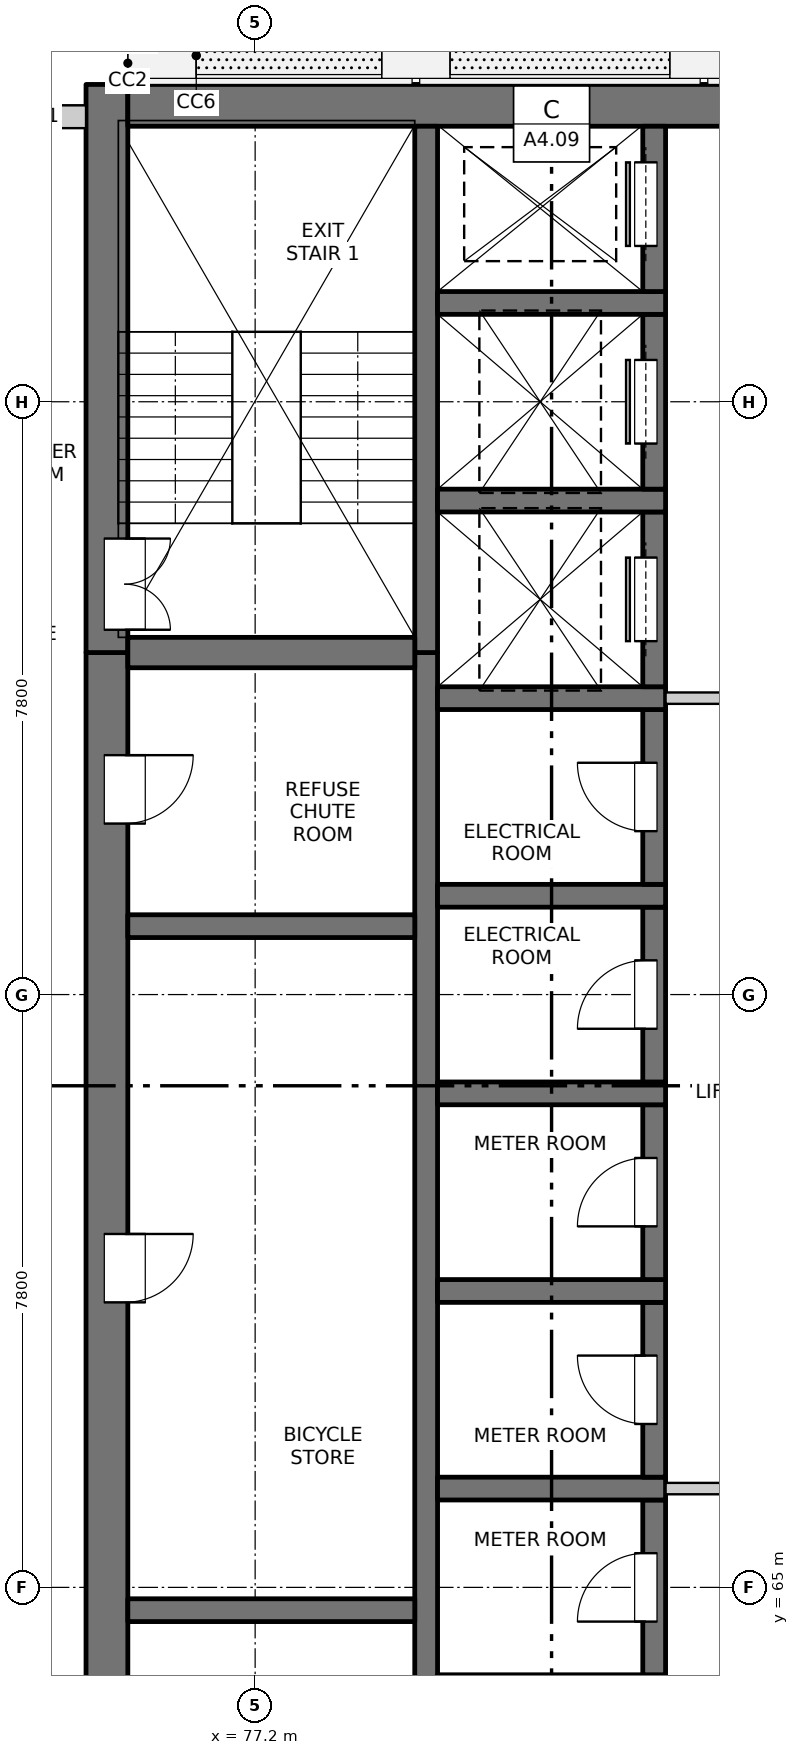
"""IFC4 building model, lengths in metres.
Left out: names, types, materials, properties, quantities, classifications, styles, units other than length and angle.
Written with IfcOpenShell. Run it as: python <this file> out.ifc"""

import sys

from ifc_helpers import new_model, si_unit, direction, frame, frame_2d, origin, place, context, subcontext, project, spatial, rectangle, extrude, element, fill, save


model = new_model("IFC4")
c1 = context("Model", 3, precision=1e-05, world=origin(), true_north=direction((0.0, 1.0)))
c2 = subcontext(c1, "Body", "Model", "MODEL_VIEW")
j1 = project(units=[si_unit("LENGTHUNIT", "METRE"), si_unit("PLANEANGLEUNIT", "RADIAN")], contexts=[c1])
p1 = place(None, origin())
s1 = spatial("IfcSite", under=j1, at=p1, CompositionType="ELEMENT")
p2 = place(p1, origin())
s2 = spatial("IfcBuilding", under=s1, at=p2, CompositionType="ELEMENT")
p3 = place(p2, frame((0.0, 0.0, 152.0)))
s3 = spatial("IfcBuildingStorey", under=s2, at=p3, CompositionType="ELEMENT", Elevation=152.0)
p4 = place(p3, frame((75.25, 54.975, -0.25), z_axis=(0.0, 0.0, 1.0), x_axis=(0.0, 1.0, 0.0)))
e1 = element("IfcWall", 1, at=p4, inside=s3, PredefinedType="SOLIDWALL", context=c2, shape_type="SweptSolid", body=[
    extrude(rectangle(XDim=22.325, YDim=0.55, at=frame_2d((11.163, 0.0))), origin(), (0.0, 0.0, 1.0), 3.4),
])
p5 = place(p4, frame((7.475, 0.0, 0.25)))
e2 = element("IfcOpeningElement", 2, at=p5, cuts=e1, PredefinedType="OPENING", context=c2, shape_type="SweptSolid", body=[
    extrude(rectangle(XDim=0.9, YDim=2.1, at=frame_2d((0.45, 1.05))), frame((0.0, 0.285, 0.0), z_axis=(0.0, -1.0, 0.0), x_axis=(1.0, 0.0, 0.0)), (0.0, 0.0, 1.0), 0.57),
])
p6 = place(p4, frame((13.775, 0.0, 0.25)))
e3 = element("IfcOpeningElement", 3, at=p6, cuts=e1, PredefinedType="OPENING", context=c2, shape_type="SweptSolid", body=[
    extrude(rectangle(XDim=0.9, YDim=2.1, at=frame_2d((0.45, 1.05))), frame((0.0, 0.285, 0.0), z_axis=(0.0, -1.0, 0.0), x_axis=(1.0, 0.0, 0.0)), (0.0, 0.0, 1.0), 0.57),
])
p7 = place(p4, frame((20.075, 0.0, 0.25)))
e4 = element("IfcOpeningElement", 4, at=p7, cuts=e1, PredefinedType="OPENING", context=c2, shape_type="SweptSolid", body=[
    extrude(rectangle(XDim=0.9, YDim=2.1, at=frame_2d((0.45, 1.05))), frame((0.0, 0.285, 0.0), z_axis=(0.0, -1.0, 0.0), x_axis=(1.0, 0.0, 0.0)), (0.0, 0.0, 1.0), 0.57),
])
p8 = place(p3, frame((75.25, 77.3, -0.25), z_axis=(0.0, 0.0, 1.0), x_axis=(0.0, 1.0, 0.0)))
e5 = element("IfcWall", 5, at=p8, inside=s3, PredefinedType="SOLIDWALL", context=c2, shape_type="SweptSolid", body=[
    extrude(rectangle(XDim=7.475, YDim=0.55, at=frame_2d((3.737, 0.0))), origin(), (0.0, 0.0, 1.0), 3.4),
])
p9 = place(p8, frame((0.3, 0.0, 0.25)))
e6 = element("IfcOpeningElement", 6, at=p9, cuts=e5, PredefinedType="OPENING", context=c2, shape_type="SweptSolid", body=[
    extrude(rectangle(XDim=1.2, YDim=2.1, at=frame_2d((0.6, 1.05))), frame((0.0, 0.285, 0.0), z_axis=(0.0, -1.0, 0.0), x_axis=(1.0, 0.0, 0.0)), (0.0, 0.0, 1.0), 0.57),
])
p10 = place(p3, frame((75.525, 84.5, -0.25), z_axis=(0.0, 0.0, 1.0), x_axis=(1.0, 0.0, 0.0)))
e7 = element("IfcWall", 7, at=p10, inside=s3, PredefinedType="SOLIDWALL", context=c2, shape_type="SweptSolid", body=[
    extrude(rectangle(XDim=18.95, YDim=0.55, at=frame_2d((9.475, 0.0))), origin(), (0.0, 0.0, 1.0), 3.4),
])
p11 = place(p3, frame((79.45, 60.95, -0.25), z_axis=(0.0, 0.0, 1.0), x_axis=(0.0, 1.0, 0.0)))
e8 = element("IfcWall", 8, at=p11, inside=s3, PredefinedType="SOLIDWALL", context=c2, shape_type="SweptSolid", body=[
    extrude(rectangle(XDim=16.35, YDim=0.3, at=frame_2d((8.175, 0.0))), origin(), (0.0, 0.0, 1.0), 3.4),
])
p12 = place(p3, frame((79.45, 77.3, -0.25), z_axis=(0.0, 0.0, 1.0), x_axis=(0.0, 1.0, 0.0)))
e9 = element("IfcWall", 9, at=p12, inside=s3, PredefinedType="SOLIDWALL", context=c2, shape_type="SweptSolid", body=[
    extrude(rectangle(XDim=6.925, YDim=0.3, at=frame_2d((3.462, 0.0))), origin(), (0.0, 0.0, 1.0), 3.4),
])
p13 = place(p3, frame((82.45, 63.85, -0.25), z_axis=(0.0, 0.0, 1.0), x_axis=(0.0, 1.0, 0.0)))
e10 = element("IfcWall", 10, at=p13, inside=s3, PredefinedType="SOLIDWALL", context=c2, shape_type="SweptSolid", body=[
    extrude(rectangle(XDim=2.3, YDim=0.3, at=frame_2d((1.15, 0.0))), origin(), (0.0, 0.0, 1.0), 3.4),
])
p14 = place(p13, frame((0.7, 0.0, 0.25)))
e11 = element("IfcOpeningElement", 11, at=p14, cuts=e10, PredefinedType="OPENING", context=c2, shape_type="SweptSolid", body=[
    extrude(rectangle(XDim=0.9, YDim=2.1, at=frame_2d((0.45, 1.05))), frame((0.0, 0.16, 0.0), z_axis=(0.0, -1.0, 0.0), x_axis=(1.0, 0.0, 0.0)), (0.0, 0.0, 1.0), 0.32),
])
p15 = place(p3, frame((79.6, 66.3, -0.25), z_axis=(0.0, 0.0, 1.0), x_axis=(1.0, 0.0, 0.0)))
e12 = element("IfcWall", 12, at=p15, inside=s3, PredefinedType="SOLIDWALL", context=c2, shape_type="SweptSolid", body=[
    extrude(rectangle(XDim=3.0, YDim=0.3, at=frame_2d((1.5, 0.0))), origin(), (0.0, 0.0, 1.0), 3.4),
])
p16 = place(p3, frame((82.45, 66.45, -0.25), z_axis=(0.0, 0.0, 1.0), x_axis=(0.0, 1.0, 0.0)))
e13 = element("IfcWall", 13, at=p16, inside=s3, PredefinedType="SOLIDWALL", context=c2, shape_type="SweptSolid", body=[
    extrude(rectangle(XDim=2.3, YDim=0.3, at=frame_2d((1.15, 0.0))), origin(), (0.0, 0.0, 1.0), 3.4),
])
p17 = place(p16, frame((0.7, 0.0, 0.25)))
e14 = element("IfcOpeningElement", 14, at=p17, cuts=e13, PredefinedType="OPENING", context=c2, shape_type="SweptSolid", body=[
    extrude(rectangle(XDim=0.9, YDim=2.1, at=frame_2d((0.45, 1.05))), frame((0.0, 0.16, 0.0), z_axis=(0.0, -1.0, 0.0), x_axis=(1.0, 0.0, 0.0)), (0.0, 0.0, 1.0), 0.32),
])
p18 = place(p3, frame((79.6, 68.9, -0.25), z_axis=(0.0, 0.0, 1.0), x_axis=(1.0, 0.0, 0.0)))
e15 = element("IfcWall", 15, at=p18, inside=s3, PredefinedType="SOLIDWALL", context=c2, shape_type="SweptSolid", body=[
    extrude(rectangle(XDim=3.0, YDim=0.3, at=frame_2d((1.5, 0.0))), origin(), (0.0, 0.0, 1.0), 3.4),
])
p19 = place(p3, frame((82.45, 69.05, -0.25), z_axis=(0.0, 0.0, 1.0), x_axis=(0.0, 1.0, 0.0)))
e16 = element("IfcWall", 16, at=p19, inside=s3, PredefinedType="SOLIDWALL", context=c2, shape_type="SweptSolid", body=[
    extrude(rectangle(XDim=2.3, YDim=0.3, at=frame_2d((1.15, 0.0))), origin(), (0.0, 0.0, 1.0), 3.4),
])
p20 = place(p19, frame((0.7, 0.0, 0.25)))
e17 = element("IfcOpeningElement", 17, at=p20, cuts=e16, PredefinedType="OPENING", context=c2, shape_type="SweptSolid", body=[
    extrude(rectangle(XDim=0.9, YDim=2.1, at=frame_2d((0.45, 1.05))), frame((0.0, 0.16, 0.0), z_axis=(0.0, -1.0, 0.0), x_axis=(1.0, 0.0, 0.0)), (0.0, 0.0, 1.0), 0.32),
])
p21 = place(p3, frame((79.6, 71.5, -0.25), z_axis=(0.0, 0.0, 1.0), x_axis=(1.0, 0.0, 0.0)))
e18 = element("IfcWall", 18, at=p21, inside=s3, PredefinedType="SOLIDWALL", context=c2, shape_type="SweptSolid", body=[
    extrude(rectangle(XDim=3.0, YDim=0.3, at=frame_2d((1.5, 0.0))), origin(), (0.0, 0.0, 1.0), 3.4),
])
p22 = place(p3, frame((82.45, 71.65, -0.25), z_axis=(0.0, 0.0, 1.0), x_axis=(0.0, 1.0, 0.0)))
e19 = element("IfcWall", 19, at=p22, inside=s3, PredefinedType="SOLIDWALL", context=c2, shape_type="SweptSolid", body=[
    extrude(rectangle(XDim=2.3, YDim=0.3, at=frame_2d((1.15, 0.0))), origin(), (0.0, 0.0, 1.0), 3.4),
])
p23 = place(p22, frame((0.7, 0.0, 0.25)))
e20 = element("IfcOpeningElement", 20, at=p23, cuts=e19, PredefinedType="OPENING", context=c2, shape_type="SweptSolid", body=[
    extrude(rectangle(XDim=0.9, YDim=2.1, at=frame_2d((0.45, 1.05))), frame((0.0, 0.16, 0.0), z_axis=(0.0, -1.0, 0.0), x_axis=(1.0, 0.0, 0.0)), (0.0, 0.0, 1.0), 0.32),
])
p24 = place(p3, frame((79.6, 74.1, -0.25), z_axis=(0.0, 0.0, 1.0), x_axis=(1.0, 0.0, 0.0)))
e21 = element("IfcWall", 21, at=p24, inside=s3, PredefinedType="SOLIDWALL", context=c2, shape_type="SweptSolid", body=[
    extrude(rectangle(XDim=3.0, YDim=0.3, at=frame_2d((1.5, 0.0))), origin(), (0.0, 0.0, 1.0), 3.4),
])
p25 = place(p3, frame((82.45, 74.25, -0.25), z_axis=(0.0, 0.0, 1.0), x_axis=(0.0, 1.0, 0.0)))
e22 = element("IfcWall", 22, at=p25, inside=s3, PredefinedType="SOLIDWALL", context=c2, shape_type="SweptSolid", body=[
    extrude(rectangle(XDim=2.3, YDim=0.3, at=frame_2d((1.15, 0.0))), origin(), (0.0, 0.0, 1.0), 3.4),
])
p26 = place(p25, frame((0.7, 0.0, 0.25)))
e23 = element("IfcOpeningElement", 23, at=p26, cuts=e22, PredefinedType="OPENING", context=c2, shape_type="SweptSolid", body=[
    extrude(rectangle(XDim=0.9, YDim=2.1, at=frame_2d((0.45, 1.05))), frame((0.0, 0.16, 0.0), z_axis=(0.0, -1.0, 0.0), x_axis=(1.0, 0.0, 0.0)), (0.0, 0.0, 1.0), 0.32),
])
p27 = place(p3, frame((79.6, 76.7, -0.25), z_axis=(0.0, 0.0, 1.0), x_axis=(1.0, 0.0, 0.0)))
e24 = element("IfcWall", 24, at=p27, inside=s3, PredefinedType="SOLIDWALL", context=c2, shape_type="SweptSolid", body=[
    extrude(rectangle(XDim=3.0, YDim=0.3, at=frame_2d((1.5, 0.0))), origin(), (0.0, 0.0, 1.0), 3.4),
])
p28 = place(p3, frame((82.45, 76.85, -0.25), z_axis=(0.0, 0.0, 1.0), x_axis=(0.0, 1.0, 0.0)))
e25 = element("IfcWall", 25, at=p28, inside=s3, PredefinedType="SOLIDWALL", context=c2, shape_type="SweptSolid", body=[
    extrude(rectangle(XDim=2.3, YDim=0.3, at=frame_2d((1.15, 0.0))), origin(), (0.0, 0.0, 1.0), 3.4),
])
p29 = place(p28, frame((0.6, 0.0, 0.25)))
e26 = element("IfcOpeningElement", 26, at=p29, cuts=e25, PredefinedType="OPENING", context=c2, shape_type="SweptSolid", body=[
    extrude(rectangle(XDim=1.1, YDim=2.1, at=frame_2d((0.55, 1.05))), frame((0.0, 0.16, 0.0), z_axis=(0.0, -1.0, 0.0), x_axis=(1.0, 0.0, 0.0)), (0.0, 0.0, 1.0), 0.32),
])
p30 = place(p3, frame((79.6, 79.3, -0.25), z_axis=(0.0, 0.0, 1.0), x_axis=(1.0, 0.0, 0.0)))
e27 = element("IfcWall", 27, at=p30, inside=s3, PredefinedType="SOLIDWALL", context=c2, shape_type="SweptSolid", body=[
    extrude(rectangle(XDim=3.0, YDim=0.3, at=frame_2d((1.5, 0.0))), origin(), (0.0, 0.0, 1.0), 3.4),
])
p31 = place(p3, frame((82.45, 79.45, -0.25), z_axis=(0.0, 0.0, 1.0), x_axis=(0.0, 1.0, 0.0)))
e28 = element("IfcWall", 28, at=p31, inside=s3, PredefinedType="SOLIDWALL", context=c2, shape_type="SweptSolid", body=[
    extrude(rectangle(XDim=2.3, YDim=0.3, at=frame_2d((1.15, 0.0))), origin(), (0.0, 0.0, 1.0), 3.4),
])
p32 = place(p31, frame((0.6, 0.0, 0.25)))
e29 = element("IfcOpeningElement", 29, at=p32, cuts=e28, PredefinedType="OPENING", context=c2, shape_type="SweptSolid", body=[
    extrude(rectangle(XDim=1.1, YDim=2.1, at=frame_2d((0.55, 1.05))), frame((0.0, 0.16, 0.0), z_axis=(0.0, -1.0, 0.0), x_axis=(1.0, 0.0, 0.0)), (0.0, 0.0, 1.0), 0.32),
])
p33 = place(p3, frame((79.6, 81.9, -0.25), z_axis=(0.0, 0.0, 1.0), x_axis=(1.0, 0.0, 0.0)))
e30 = element("IfcWall", 30, at=p33, inside=s3, PredefinedType="SOLIDWALL", context=c2, shape_type="SweptSolid", body=[
    extrude(rectangle(XDim=3.0, YDim=0.3, at=frame_2d((1.5, 0.0))), origin(), (0.0, 0.0, 1.0), 3.4),
])
p34 = place(p3, frame((82.45, 82.05, -0.25), z_axis=(0.0, 0.0, 1.0), x_axis=(0.0, 1.0, 0.0)))
e31 = element("IfcWall", 31, at=p34, inside=s3, PredefinedType="SOLIDWALL", context=c2, shape_type="SweptSolid", body=[
    extrude(rectangle(XDim=2.175, YDim=0.3, at=frame_2d((1.087, 0.0))), origin(), (0.0, 0.0, 1.0), 3.4),
])
p35 = place(p34, frame((0.6, 0.0, 0.25)))
e32 = element("IfcOpeningElement", 32, at=p35, cuts=e31, PredefinedType="OPENING", context=c2, shape_type="SweptSolid", body=[
    extrude(rectangle(XDim=1.1, YDim=2.1, at=frame_2d((0.55, 1.05))), frame((0.0, 0.16, 0.0), z_axis=(0.0, -1.0, 0.0), x_axis=(1.0, 0.0, 0.0)), (0.0, 0.0, 1.0), 0.32),
])
for number, where, z_axis, x_axis in (
    (33, (75.525, 64.7, -0.25), (0.0, 0.0, 1.0), (1.0, 0.0, 0.0)),
    (34, (75.525, 73.7, -0.25), (0.0, 0.0, 1.0), (1.0, 0.0, 0.0)),
):
    element("IfcWall", number, at=place(p3, frame(where, z_axis=z_axis, x_axis=x_axis)), inside=s3, PredefinedType="SOLIDWALL", context=c2, shape_type="SweptSolid", body=[
        extrude(rectangle(XDim=3.775, YDim=0.3, at=frame_2d((1.888, 0.0))), origin(), (0.0, 0.0, 1.0), 3.4),
    ])
p36 = place(p3, frame((75.525, 77.3, -0.25), z_axis=(0.0, 0.0, 1.0), x_axis=(1.0, 0.0, 0.0)))
e35 = element("IfcWall", 35, at=p36, inside=s3, PredefinedType="SOLIDWALL", context=c2, shape_type="SweptSolid", body=[
    extrude(rectangle(XDim=3.775, YDim=0.4, at=frame_2d((1.888, 0.0))), origin(), (0.0, 0.0, 1.0), 3.4),
])
p37 = place(p3, frame((73.675, 84.35, 0.0), z_axis=(0.0, 0.0, 1.0), x_axis=(1.0, 0.0, 0.0)))
e36 = element("IfcWall", 36, at=p37, inside=s3, PredefinedType="SOLIDWALL", context=c2, shape_type="SweptSolid", body=[
    extrude(rectangle(XDim=1.3, YDim=0.3, at=frame_2d((0.65, 0.0))), origin(), (0.0, 0.0, 1.0), 2.7),
])
p38 = place(p3, frame((82.6, 66.3, 0.0), z_axis=(0.0, 0.0, 1.0), x_axis=(1.0, 0.0, 0.0)))
e37 = element("IfcWall", 37, at=p38, inside=s3, PredefinedType="PARTITIONING", context=c2, shape_type="SweptSolid", body=[
    extrude(rectangle(XDim=4.8, YDim=0.15, at=frame_2d((2.4, 0.0))), origin(), (0.0, 0.0, 1.0), 3.15),
])
p39 = place(p38, frame((1.5, 0.0, 0.0)))
e38 = element("IfcOpeningElement", 38, at=p39, cuts=e37, PredefinedType="OPENING", context=c2, shape_type="SweptSolid", body=[
    extrude(rectangle(XDim=1.8, YDim=2.1, at=frame_2d((0.9, 1.05))), frame((0.0, 0.085, 0.0), z_axis=(0.0, -1.0, 0.0), x_axis=(1.0, 0.0, 0.0)), (0.0, 0.0, 1.0), 0.17),
])
p40 = place(p3, frame((82.6, 76.7, 0.0), z_axis=(0.0, 0.0, 1.0), x_axis=(1.0, 0.0, 0.0)))
e39 = element("IfcWall", 39, at=p40, inside=s3, PredefinedType="PARTITIONING", context=c2, shape_type="SweptSolid", body=[
    extrude(rectangle(XDim=4.8, YDim=0.15, at=frame_2d((2.4, 0.0))), origin(), (0.0, 0.0, 1.0), 3.15),
])
p41 = place(p40, frame((1.5, 0.0, 0.0)))
e40 = element("IfcOpeningElement", 40, at=p41, cuts=e39, PredefinedType="OPENING", context=c2, shape_type="SweptSolid", body=[
    extrude(rectangle(XDim=1.8, YDim=2.1, at=frame_2d((0.9, 1.05))), frame((0.0, 0.085, 0.0), z_axis=(0.0, -1.0, 0.0), x_axis=(1.0, 0.0, 0.0)), (0.0, 0.0, 1.0), 0.17),
])
p42 = place(p14, origin())
e41 = element("IfcDoor", 41, at=p42, inside=s3, OperationType="SINGLE_SWING_LEFT", PredefinedType="DOOR", context=c2, shape_type="SweptSolid", body=[
    extrude(rectangle(XDim=0.9, YDim=2.1, at=frame_2d((0.45, 1.05))), frame((0.0, 0.135, 0.0), z_axis=(0.0, -1.0, 0.0), x_axis=(1.0, 0.0, 0.0)), (0.0, 0.0, 1.0), 0.05),
])
fill(e11, e41)
p43 = place(p17, origin())
e42 = element("IfcDoor", 42, at=p43, inside=s3, OperationType="SINGLE_SWING_RIGHT", PredefinedType="DOOR", context=c2, shape_type="SweptSolid", body=[
    extrude(rectangle(XDim=0.9, YDim=2.1, at=frame_2d((0.45, 1.05))), frame((0.0, 0.135, 0.0), z_axis=(0.0, -1.0, 0.0), x_axis=(1.0, 0.0, 0.0)), (0.0, 0.0, 1.0), 0.05),
])
fill(e14, e42)
p44 = place(p6, origin())
e43 = element("IfcDoor", 43, at=p44, inside=s3, OperationType="SINGLE_SWING_LEFT", PredefinedType="DOOR", context=c2, shape_type="SweptSolid", body=[
    extrude(rectangle(XDim=0.9, YDim=2.1, at=frame_2d((0.45, 1.05))), frame((0.0, -0.21, 0.0), z_axis=(0.0, -1.0, 0.0), x_axis=(1.0, 0.0, 0.0)), (0.0, 0.0, 1.0), 0.05),
])
fill(e3, e43)
p45 = place(p20, origin())
e44 = element("IfcDoor", 44, at=p45, inside=s3, OperationType="SINGLE_SWING_LEFT", PredefinedType="DOOR", context=c2, shape_type="SweptSolid", body=[
    extrude(rectangle(XDim=0.9, YDim=2.1, at=frame_2d((0.45, 1.05))), frame((0.0, 0.135, 0.0), z_axis=(0.0, -1.0, 0.0), x_axis=(1.0, 0.0, 0.0)), (0.0, 0.0, 1.0), 0.05),
])
fill(e17, e44)
p46 = place(p23, origin())
e45 = element("IfcDoor", 45, at=p46, inside=s3, OperationType="SINGLE_SWING_LEFT", PredefinedType="DOOR", context=c2, shape_type="SweptSolid", body=[
    extrude(rectangle(XDim=0.9, YDim=2.1, at=frame_2d((0.45, 1.05))), frame((0.0, 0.135, 0.0), z_axis=(0.0, -1.0, 0.0), x_axis=(1.0, 0.0, 0.0)), (0.0, 0.0, 1.0), 0.05),
])
fill(e20, e45)
p47 = place(p26, origin())
e46 = element("IfcDoor", 46, at=p47, inside=s3, OperationType="SINGLE_SWING_RIGHT", PredefinedType="DOOR", context=c2, shape_type="SweptSolid", body=[
    extrude(rectangle(XDim=0.9, YDim=2.1, at=frame_2d((0.45, 1.05))), frame((0.0, 0.135, 0.0), z_axis=(0.0, -1.0, 0.0), x_axis=(1.0, 0.0, 0.0)), (0.0, 0.0, 1.0), 0.05),
])
fill(e23, e46)
p48 = place(p7, origin())
e47 = element("IfcDoor", 47, at=p48, inside=s3, OperationType="SINGLE_SWING_LEFT", PredefinedType="DOOR", context=c2, shape_type="SweptSolid", body=[
    extrude(rectangle(XDim=0.9, YDim=2.1, at=frame_2d((0.45, 1.05))), frame((0.0, -0.21, 0.0), z_axis=(0.0, -1.0, 0.0), x_axis=(1.0, 0.0, 0.0)), (0.0, 0.0, 1.0), 0.05),
])
fill(e4, e47)
p49 = place(p29, origin())
e48 = element("IfcDoor", 48, at=p49, inside=s3, OperationType="SLIDING_TO_LEFT", PredefinedType="DOOR", context=c2, shape_type="SweptSolid", body=[
    extrude(rectangle(XDim=1.1, YDim=2.1, at=frame_2d((0.55, 1.05))), frame((0.0, 0.135, 0.0), z_axis=(0.0, -1.0, 0.0), x_axis=(1.0, 0.0, 0.0)), (0.0, 0.0, 1.0), 0.05),
])
fill(e26, e48)
p50 = place(p9, origin())
e49 = element("IfcDoor", 49, at=p50, inside=s3, OperationType="DOUBLE_DOOR_SINGLE_SWING", PredefinedType="DOOR", context=c2, shape_type="SweptSolid", body=[
    extrude(rectangle(XDim=1.2, YDim=2.1, at=frame_2d((0.6, 1.05))), frame((0.0, -0.21, 0.0), z_axis=(0.0, -1.0, 0.0), x_axis=(1.0, 0.0, 0.0)), (0.0, 0.0, 1.0), 0.05),
])
fill(e6, e49)
p51 = place(p32, origin())
e50 = element("IfcDoor", 50, at=p51, inside=s3, OperationType="SLIDING_TO_LEFT", PredefinedType="DOOR", context=c2, shape_type="SweptSolid", body=[
    extrude(rectangle(XDim=1.1, YDim=2.1, at=frame_2d((0.55, 1.05))), frame((0.0, 0.135, 0.0), z_axis=(0.0, -1.0, 0.0), x_axis=(1.0, 0.0, 0.0)), (0.0, 0.0, 1.0), 0.05),
])
fill(e29, e50)
p52 = place(p35, origin())
e51 = element("IfcDoor", 51, at=p52, inside=s3, OperationType="SLIDING_TO_RIGHT", PredefinedType="DOOR", context=c2, shape_type="SweptSolid", body=[
    extrude(rectangle(XDim=1.1, YDim=2.1, at=frame_2d((0.55, 1.05))), frame((0.0, 0.135, 0.0), z_axis=(0.0, -1.0, 0.0), x_axis=(1.0, 0.0, 0.0)), (0.0, 0.0, 1.0), 0.05),
])
fill(e32, e51)
save(model, sys.argv[1])
